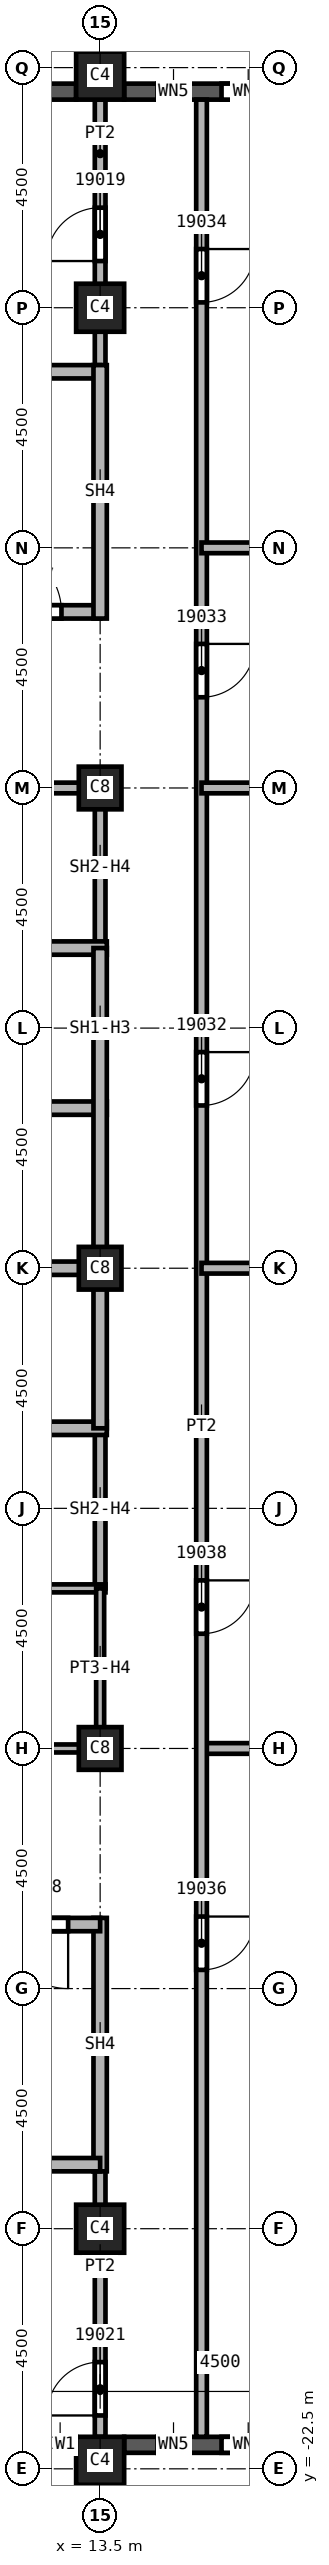
"""IFC4 building model, lengths in metres.
Left out: names, types, materials, properties, quantities, classifications, styles, units other than length and angle.
Written with IfcOpenShell. Run it as: python <this file> out.ifc"""

import sys

from ifc_helpers import new_model, si_unit, direction, frame, frame_2d, origin, origin_2d, place, context, subcontext, project, spatial, rectangle, extrude, element, fill, save


model = new_model("IFC4")
c1 = context("Model", 3, precision=1e-05, world=origin(), true_north=direction((0.0, 1.0)))
c2 = subcontext(c1, "Body", "Model", "MODEL_VIEW")
j1 = project(units=[si_unit("LENGTHUNIT", "METRE"), si_unit("PLANEANGLEUNIT", "RADIAN")], contexts=[c1])
p1 = place(None, origin())
s1 = spatial("IfcSite", under=j1, at=p1, CompositionType="ELEMENT")
p2 = place(p1, origin())
s2 = spatial("IfcBuilding", under=s1, at=p2, CompositionType="ELEMENT")
p3 = place(p2, frame((0.0, 0.0, 278.0)))
s3 = spatial("IfcBuildingStorey", under=s2, at=p3, CompositionType="ELEMENT", Elevation=278.0)
for number, where, z_axis, x_axis in (
    (1, (13.5, 18.0, 0.0), (0.0, 0.0, 1.0), (1.0, 0.0, 0.0)),
    (2, (13.5, -18.0, 0.0), (0.0, 0.0, 1.0), (1.0, 0.0, 0.0)),
):
    element("IfcColumn", number, at=place(p3, frame(where, z_axis=z_axis, x_axis=x_axis)), inside=s3, PredefinedType="COLUMN", context=c2, shape_type="SweptSolid", body=[
        extrude(rectangle(XDim=0.9, YDim=0.9, at=origin_2d()), origin(), (0.0, 0.0, 1.0), 3.72),
    ])
for number, where, z_axis, x_axis in (
    (3, (13.5, 0.0, 0.0), (0.0, 0.0, 1.0), (1.0, 0.0, 0.0)),
    (4, (13.5, 9.0, 0.0), (0.0, 0.0, 1.0), (1.0, 0.0, 0.0)),
    (5, (13.5, -9.0, 0.0), (0.0, 0.0, 1.0), (1.0, 0.0, 0.0)),
):
    element("IfcColumn", number, at=place(p3, frame(where, z_axis=z_axis, x_axis=x_axis)), inside=s3, PredefinedType="COLUMN", context=c2, shape_type="SweptSolid", body=[
        extrude(rectangle(XDim=0.8, YDim=0.8, at=origin_2d()), origin(), (0.0, 0.0, 1.0), 3.72),
    ])
for number, where, z_axis, x_axis in (
    (6, (13.5, 22.35, 0.0), (0.0, 0.0, 1.0), (1.0, 0.0, 0.0)),
    (7, (13.5, -22.35, 0.0), (0.0, 0.0, 1.0), (1.0, 0.0, 0.0)),
):
    element("IfcColumn", number, at=place(p3, frame(where, z_axis=z_axis, x_axis=x_axis)), inside=s3, PredefinedType="COLUMN", context=c2, shape_type="SweptSolid", body=[
        extrude(rectangle(XDim=0.9, YDim=0.9, at=origin_2d()), origin(), (0.0, 0.0, 1.0), 3.72),
    ])
p4 = place(p3, frame((9.45, -22.05, 0.0), z_axis=(0.0, 0.0, 1.0), x_axis=(1.0, 0.0, 0.0)))
e8 = element("IfcWall", 8, at=p4, inside=s3, PredefinedType="SOLIDWALL", context=c2, shape_type="SweptSolid", body=[
    extrude(rectangle(XDim=3.6, YDim=0.3, at=frame_2d((1.8, 0.0))), origin(), (0.0, 0.0, 1.0), 3.12),
])
p5 = place(p4, frame((0.6, 0.0, 0.8)))
e9 = element("IfcOpeningElement", 9, at=p5, cuts=e8, PredefinedType="OPENING", context=c2, shape_type="SweptSolid", body=[
    extrude(rectangle(XDim=2.4, YDim=1.95, at=frame_2d((1.2, 0.975))), frame((0.0, 0.15, 0.0), z_axis=(0.0, -1.0, 0.0), x_axis=(1.0, 0.0, 0.0)), (0.0, 0.0, 1.0), 0.3),
])
p6 = place(p3, frame((13.95, -22.05, 0.0), z_axis=(0.0, 0.0, 1.0), x_axis=(1.0, 0.0, 0.0)))
e10 = element("IfcWall", 10, at=p6, inside=s3, PredefinedType="SOLIDWALL", context=c2, shape_type="SweptSolid", body=[
    extrude(rectangle(XDim=3.6, YDim=0.3, at=frame_2d((1.8, 0.0))), origin(), (0.0, 0.0, 1.0), 3.12),
])
p7 = place(p6, frame((0.625, 0.0, 0.8)))
e11 = element("IfcOpeningElement", 11, at=p7, cuts=e10, PredefinedType="OPENING", context=c2, shape_type="SweptSolid", body=[
    extrude(rectangle(XDim=0.6, YDim=1.95, at=frame_2d((0.3, 0.975))), frame((0.0, 0.15, 0.0), z_axis=(0.0, -1.0, 0.0), x_axis=(1.0, 0.0, 0.0)), (0.0, 0.0, 1.0), 0.3),
])
p8 = place(p6, frame((1.825, 0.0, 0.8)))
e12 = element("IfcOpeningElement", 12, at=p8, cuts=e10, PredefinedType="OPENING", context=c2, shape_type="SweptSolid", body=[
    extrude(rectangle(XDim=1.0, YDim=1.95, at=frame_2d((0.5, 0.975))), frame((0.0, 0.15, 0.0), z_axis=(0.0, -1.0, 0.0), x_axis=(1.0, 0.0, 0.0)), (0.0, 0.0, 1.0), 0.3),
])
p9 = place(p3, frame((17.55, 22.05, 0.0), z_axis=(0.0, 0.0, 1.0), x_axis=(-1.0, 0.0, 0.0)))
e13 = element("IfcWall", 13, at=p9, inside=s3, PredefinedType="SOLIDWALL", context=c2, shape_type="SweptSolid", body=[
    extrude(rectangle(XDim=3.6, YDim=0.3, at=frame_2d((1.8, 0.0))), origin(), (0.0, 0.0, 1.0), 3.12),
])
p10 = place(p9, frame((0.775, 0.0, 0.8)))
e14 = element("IfcOpeningElement", 14, at=p10, cuts=e13, PredefinedType="OPENING", context=c2, shape_type="SweptSolid", body=[
    extrude(rectangle(XDim=1.0, YDim=1.95, at=frame_2d((0.5, 0.975))), frame((0.0, 0.15, 0.0), z_axis=(0.0, -1.0, 0.0), x_axis=(1.0, 0.0, 0.0)), (0.0, 0.0, 1.0), 0.3),
])
p11 = place(p9, frame((2.375, 0.0, 0.8)))
e15 = element("IfcOpeningElement", 15, at=p11, cuts=e13, PredefinedType="OPENING", context=c2, shape_type="SweptSolid", body=[
    extrude(rectangle(XDim=0.6, YDim=1.95, at=frame_2d((0.3, 0.975))), frame((0.0, 0.15, 0.0), z_axis=(0.0, -1.0, 0.0), x_axis=(1.0, 0.0, 0.0)), (0.0, 0.0, 1.0), 0.3),
])
p12 = place(p3, frame((13.05, 22.05, 0.0), z_axis=(0.0, 0.0, 1.0), x_axis=(-1.0, 0.0, 0.0)))
e16 = element("IfcWall", 16, at=p12, inside=s3, PredefinedType="SOLIDWALL", context=c2, shape_type="SweptSolid", body=[
    extrude(rectangle(XDim=3.6, YDim=0.3, at=frame_2d((1.8, 0.0))), origin(), (0.0, 0.0, 1.0), 3.12),
])
p13 = place(p12, frame((0.6, 0.0, 0.8)))
e17 = element("IfcOpeningElement", 17, at=p13, cuts=e16, PredefinedType="OPENING", context=c2, shape_type="SweptSolid", body=[
    extrude(rectangle(XDim=2.4, YDim=1.95, at=frame_2d((1.2, 0.975))), frame((0.0, 0.15, 0.0), z_axis=(0.0, -1.0, 0.0), x_axis=(1.0, 0.0, 0.0)), (0.0, 0.0, 1.0), 0.3),
])
p14 = place(p3, frame((13.5, -21.9, 0.0), z_axis=(0.0, 0.0, 1.0), x_axis=(0.0, 1.0, 0.0)))
e18 = element("IfcWall", 18, at=p14, inside=s3, PredefinedType="PARTITIONING", context=c2, shape_type="SweptSolid", body=[
    extrude(rectangle(XDim=5.225, YDim=0.2, at=frame_2d((2.612, 0.0))), origin(), (0.0, 0.0, 1.0), 3.72),
])
p15 = place(p14, frame((0.4, 0.0, 0.0)))
e19 = element("IfcOpeningElement", 19, at=p15, cuts=e18, PredefinedType="OPENING", context=c2, shape_type="SweptSolid", body=[
    extrude(rectangle(XDim=1.0, YDim=2.1, at=frame_2d((0.5, 1.05))), frame((0.0, 0.1, 0.0), z_axis=(0.0, -1.0, 0.0), x_axis=(1.0, 0.0, 0.0)), (0.0, 0.0, 1.0), 0.2),
])
p16 = place(p3, frame((13.5, 16.675, 0.0), z_axis=(0.0, 0.0, 1.0), x_axis=(0.0, 1.0, 0.0)))
e20 = element("IfcWall", 20, at=p16, inside=s3, PredefinedType="PARTITIONING", context=c2, shape_type="SweptSolid", body=[
    extrude(rectangle(XDim=5.225, YDim=0.2, at=frame_2d((2.612, 0.0))), origin(), (0.0, 0.0, 1.0), 3.72),
])
p17 = place(p16, frame((2.2, 0.0, 0.0)))
e21 = element("IfcOpeningElement", 21, at=p17, cuts=e20, PredefinedType="OPENING", context=c2, shape_type="SweptSolid", body=[
    extrude(rectangle(XDim=1.0, YDim=2.1, at=frame_2d((0.5, 1.05))), frame((0.0, 0.1, 0.0), z_axis=(0.0, -1.0, 0.0), x_axis=(1.0, 0.0, 0.0)), (0.0, 0.0, 1.0), 0.2),
])
p18 = place(p3, frame((15.4, -9.0, 0.0), z_axis=(0.0, 0.0, 1.0), x_axis=(1.0, 0.0, 0.0)))
e22 = element("IfcWall", 22, at=p18, inside=s3, PredefinedType="PARTITIONING", context=c2, shape_type="SweptSolid", body=[
    extrude(rectangle(XDim=11.15, YDim=0.2, at=frame_2d((5.575, 0.0))), origin(), (0.0, 0.0, 1.0), 3.72),
])
p19 = place(p3, frame((15.4, 21.9, 0.0), z_axis=(0.0, 0.0, 1.0), x_axis=(0.0, -1.0, 0.0)))
e23 = element("IfcWall", 23, at=p19, inside=s3, PredefinedType="PARTITIONING", context=c2, shape_type="SweptSolid", body=[
    extrude(rectangle(XDim=43.8, YDim=0.2, at=frame_2d((21.9, 0.0))), origin(), (0.0, 0.0, 1.0), 3.72),
])
p20 = place(p19, frame((17.85, 0.0, 0.0)))
e24 = element("IfcOpeningElement", 24, at=p20, cuts=e23, PredefinedType="OPENING", context=c2, shape_type="SweptSolid", body=[
    extrude(rectangle(XDim=1.0, YDim=2.1, at=frame_2d((0.5, 1.05))), frame((0.0, 0.1, 0.0), z_axis=(0.0, -1.0, 0.0), x_axis=(1.0, 0.0, 0.0)), (0.0, 0.0, 1.0), 0.2),
])
p21 = place(p19, frame((10.2, 0.0, 0.0)))
e25 = element("IfcOpeningElement", 25, at=p21, cuts=e23, PredefinedType="OPENING", context=c2, shape_type="SweptSolid", body=[
    extrude(rectangle(XDim=1.0, YDim=2.1, at=frame_2d((0.5, 1.05))), frame((0.0, 0.1, 0.0), z_axis=(0.0, -1.0, 0.0), x_axis=(1.0, 0.0, 0.0)), (0.0, 0.0, 1.0), 0.2),
])
p22 = place(p19, frame((2.8, 0.0, 0.0)))
e26 = element("IfcOpeningElement", 26, at=p22, cuts=e23, PredefinedType="OPENING", context=c2, shape_type="SweptSolid", body=[
    extrude(rectangle(XDim=1.0, YDim=2.1, at=frame_2d((0.5, 1.05))), frame((0.0, 0.1, 0.0), z_axis=(0.0, -1.0, 0.0), x_axis=(1.0, 0.0, 0.0)), (0.0, 0.0, 1.0), 0.2),
])
p23 = place(p19, frame((34.05, 0.0, 0.0)))
e27 = element("IfcOpeningElement", 27, at=p23, cuts=e23, PredefinedType="OPENING", context=c2, shape_type="SweptSolid", body=[
    extrude(rectangle(XDim=1.0, YDim=2.1, at=frame_2d((0.5, 1.05))), frame((0.0, 0.1, 0.0), z_axis=(0.0, -1.0, 0.0), x_axis=(1.0, 0.0, 0.0)), (0.0, 0.0, 1.0), 0.2),
])
p24 = place(p19, frame((27.75, 0.0, 0.0)))
e28 = element("IfcOpeningElement", 28, at=p24, cuts=e23, PredefinedType="OPENING", context=c2, shape_type="SweptSolid", body=[
    extrude(rectangle(XDim=1.0, YDim=2.1, at=frame_2d((0.5, 1.05))), frame((0.0, 0.1, 0.0), z_axis=(0.0, -1.0, 0.0), x_axis=(1.0, 0.0, 0.0)), (0.0, 0.0, 1.0), 0.2),
])
for number, where, z_axis, x_axis in (
    (29, (15.4, 9.0, 0.0), (0.0, 0.0, 1.0), (1.0, 0.0, 0.0)),
    (30, (15.4, 13.5, 0.0), (0.0, 0.0, 1.0), (1.0, 0.0, 0.0)),
    (31, (26.55, 0.0, 0.0), (0.0, 0.0, 1.0), (-1.0, 0.0, 0.0)),
):
    element("IfcWall", number, at=place(p3, frame(where, z_axis=z_axis, x_axis=x_axis)), inside=s3, PredefinedType="PARTITIONING", context=c2, shape_type="SweptSolid", body=[
        extrude(rectangle(XDim=11.15, YDim=0.2, at=frame_2d((5.575, 0.0))), origin(), (0.0, 0.0, 1.0), 3.72),
    ])
for number, where, z_axis, x_axis in (
    (32, (10.5, 9.0, 0.0), (0.0, 0.0, 1.0), (1.0, 0.0, 0.0)),
    (33, (13.5, -3.0, 0.0), (0.0, 0.0, 1.0), (0.0, -1.0, 0.0)),
):
    element("IfcWall", number, at=place(p3, frame(where, z_axis=z_axis, x_axis=x_axis)), inside=s3, PredefinedType="SOLIDWALL", context=c2, shape_type="SweptSolid", body=[
        extrude(rectangle(XDim=3.0, YDim=0.2, at=frame_2d((1.5, 0.0))), origin(), (0.0, 0.0, 1.0), 3.042),
    ])
p25 = place(p3, frame((13.5, 9.1, 0.0), z_axis=(0.0, 0.0, 1.0), x_axis=(0.0, -1.0, 0.0)))
e34 = element("IfcWall", 34, at=p25, inside=s3, PredefinedType="SOLIDWALL", context=c2, shape_type="SweptSolid", body=[
    extrude(rectangle(XDim=3.1, YDim=0.2, at=frame_2d((1.55, 0.0))), origin(), (0.0, 0.0, 1.0), 3.042),
])
p26 = place(p3, frame((4.375, -3.0, 0.0), z_axis=(0.0, 0.0, 1.0), x_axis=(1.0, 0.0, 0.0)))
e35 = element("IfcWall", 35, at=p26, inside=s3, PredefinedType="SOLIDWALL", context=c2, shape_type="SweptSolid", body=[
    extrude(rectangle(XDim=9.25, YDim=0.25, at=frame_2d((4.625, 0.0))), origin(), (0.0, 0.0, 1.0), 3.72),
])
p27 = place(p26, frame((4.875, 0.0, 0.0)))
e36 = element("IfcOpeningElement", 36, at=p27, cuts=e35, PredefinedType="OPENING", context=c2, shape_type="SweptSolid", body=[
    extrude(rectangle(XDim=1.1, YDim=2.1, at=frame_2d((0.55, 1.05))), frame((0.0, 0.125, 0.0), z_axis=(0.0, -1.0, 0.0), x_axis=(1.0, 0.0, 0.0)), (0.0, 0.0, 1.0), 0.25),
])
p28 = place(p3, frame((7.5, 3.0, 0.0), z_axis=(0.0, 0.0, 1.0), x_axis=(1.0, 0.0, 0.0)))
e37 = element("IfcWall", 37, at=p28, inside=s3, PredefinedType="SOLIDWALL", context=c2, shape_type="SweptSolid", body=[
    extrude(rectangle(XDim=6.125, YDim=0.25, at=frame_2d((3.062, 0.0))), origin(), (0.0, 0.0, 1.0), 3.72),
])
p29 = place(p28, frame((1.75, 0.0, 0.0)))
e38 = element("IfcOpeningElement", 38, at=p29, cuts=e37, PredefinedType="OPENING", context=c2, shape_type="SweptSolid", body=[
    extrude(rectangle(XDim=1.1, YDim=2.1, at=frame_2d((0.55, 1.05))), frame((0.0, 0.125, 0.0), z_axis=(0.0, -1.0, 0.0), x_axis=(1.0, 0.0, 0.0)), (0.0, 0.0, 1.0), 0.25),
])
for number, where, z_axis, x_axis in (
    (39, (10.5, 0.0, 0.0), (0.0, 0.0, 1.0), (1.0, 0.0, 0.0)),
    (40, (10.5, 6.0, 0.0), (0.0, 0.0, 1.0), (1.0, 0.0, 0.0)),
):
    element("IfcWall", number, at=place(p3, frame(where, z_axis=z_axis, x_axis=x_axis)), inside=s3, PredefinedType="SOLIDWALL", context=c2, shape_type="SweptSolid", body=[
        extrude(rectangle(XDim=3.125, YDim=0.25, at=frame_2d((1.562, 0.0))), origin(), (0.0, 0.0, 1.0), 3.72),
    ])
p30 = place(p3, frame((13.5, 6.0, 0.0), z_axis=(0.0, 0.0, 1.0), x_axis=(0.0, -1.0, 0.0)))
e41 = element("IfcWall", 41, at=p30, inside=s3, PredefinedType="SOLIDWALL", context=c2, shape_type="SweptSolid", body=[
    extrude(rectangle(XDim=9.0, YDim=0.25, at=frame_2d((4.5, 0.0))), origin(), (0.0, 0.0, 1.0), 3.042),
])
p31 = place(p3, frame((4.375, 12.3, 0.0), z_axis=(0.0, 0.0, 1.0), x_axis=(1.0, 0.0, 0.0)))
e42 = element("IfcWall", 42, at=p31, inside=s3, PredefinedType="SOLIDWALL", context=c2, shape_type="SweptSolid", body=[
    extrude(rectangle(XDim=9.125, YDim=0.25, at=frame_2d((4.562, 0.0))), origin(), (0.0, 0.0, 1.0), 3.72),
])
p32 = place(p31, frame((7.2, 0.0, 0.0)))
e43 = element("IfcOpeningElement", 43, at=p32, cuts=e42, PredefinedType="OPENING", context=c2, shape_type="SweptSolid", body=[
    extrude(rectangle(XDim=1.2, YDim=2.1, at=frame_2d((0.6, 1.05))), frame((0.0, 0.125, 0.0), z_axis=(0.0, -1.0, 0.0), x_axis=(1.0, 0.0, 0.0)), (0.0, 0.0, 1.0), 0.25),
])
p33 = place(p3, frame((4.375, 16.8, 0.0), z_axis=(0.0, 0.0, 1.0), x_axis=(1.0, 0.0, 0.0)))
e44 = element("IfcWall", 44, at=p33, inside=s3, PredefinedType="SOLIDWALL", context=c2, shape_type="SweptSolid", body=[
    extrude(rectangle(XDim=9.125, YDim=0.25, at=frame_2d((4.562, 0.0))), origin(), (0.0, 0.0, 1.0), 3.72),
])
p34 = place(p3, frame((13.5, -16.925, 0.0), z_axis=(0.0, 0.0, 1.0), x_axis=(0.0, 1.0, 0.0)))
e45 = element("IfcWall", 45, at=p34, inside=s3, PredefinedType="SOLIDWALL", context=c2, shape_type="SweptSolid", body=[
    extrude(rectangle(XDim=4.75, YDim=0.25, at=frame_2d((2.375, 0.0))), origin(), (0.0, 0.0, 1.0), 3.72),
])
p35 = place(p3, frame((13.5, -16.8, 0.0), z_axis=(0.0, 0.0, 1.0), x_axis=(-1.0, 0.0, 0.0)))
e46 = element("IfcWall", 46, at=p35, inside=s3, PredefinedType="SOLIDWALL", context=c2, shape_type="SweptSolid", body=[
    extrude(rectangle(XDim=9.125, YDim=0.25, at=frame_2d((4.562, 0.0))), origin(), (0.0, 0.0, 1.0), 3.72),
])
p36 = place(p3, frame((13.5, -12.3, 0.0), z_axis=(0.0, 0.0, 1.0), x_axis=(-1.0, 0.0, 0.0)))
e47 = element("IfcWall", 47, at=p36, inside=s3, PredefinedType="SOLIDWALL", context=c2, shape_type="SweptSolid", body=[
    extrude(rectangle(XDim=9.125, YDim=0.25, at=frame_2d((4.562, 0.0))), origin(), (0.0, 0.0, 1.0), 3.72),
])
p37 = place(p36, frame((0.6, 0.0, 0.0)))
e48 = element("IfcOpeningElement", 48, at=p37, cuts=e47, PredefinedType="OPENING", context=c2, shape_type="SweptSolid", body=[
    extrude(rectangle(XDim=1.2, YDim=2.1, at=frame_2d((0.6, 1.05))), frame((0.0, 0.125, 0.0), z_axis=(0.0, -1.0, 0.0), x_axis=(1.0, 0.0, 0.0)), (0.0, 0.0, 1.0), 0.25),
])
p38 = place(p3, frame((13.5, 12.175, 0.0), z_axis=(0.0, 0.0, 1.0), x_axis=(0.0, 1.0, 0.0)))
e49 = element("IfcWall", 49, at=p38, inside=s3, PredefinedType="SOLIDWALL", context=c2, shape_type="SweptSolid", body=[
    extrude(rectangle(XDim=4.75, YDim=0.25, at=frame_2d((2.375, 0.0))), origin(), (0.0, 0.0, 1.0), 3.72),
])
p39 = place(p3, frame((10.5, -6.0, 0.0), z_axis=(0.0, 0.0, 1.0), x_axis=(1.0, 0.0, 0.0)))
e50 = element("IfcWall", 50, at=p39, inside=s3, PredefinedType="PARTITIONING", context=c2, shape_type="SweptSolid", body=[
    extrude(rectangle(XDim=3.1, YDim=0.15, at=frame_2d((1.55, 0.0))), origin(), (0.0, 0.0, 1.0), 3.72),
])
p40 = place(p3, frame((13.5, -9.0, 0.0), z_axis=(0.0, 0.0, 1.0), x_axis=(-1.0, 0.0, 0.0)))
e51 = element("IfcWall", 51, at=p40, inside=s3, PredefinedType="PARTITIONING", context=c2, shape_type="SweptSolid", body=[
    extrude(rectangle(XDim=3.0, YDim=0.15, at=frame_2d((1.5, 0.0))), origin(), (0.0, 0.0, 1.0), 3.042),
])
p41 = place(p3, frame((13.5, -6.0, 0.0), z_axis=(0.0, 0.0, 1.0), x_axis=(0.0, -1.0, 0.0)))
e52 = element("IfcWall", 52, at=p41, inside=s3, PredefinedType="PARTITIONING", context=c2, shape_type="SweptSolid", body=[
    extrude(rectangle(XDim=3.075, YDim=0.15, at=frame_2d((1.538, 0.0))), origin(), (0.0, 0.0, 1.0), 3.042),
])
p42 = place(p32, origin())
e53 = element("IfcDoor", 53, at=p42, inside=s3, OperationType="SINGLE_SWING_RIGHT", PredefinedType="DOOR", context=c2, shape_type="SweptSolid", body=[
    extrude(rectangle(XDim=1.2, YDim=2.1, at=frame_2d((0.6, 1.05))), frame((0.0, 0.025, 0.0), z_axis=(0.0, -1.0, 0.0), x_axis=(1.0, 0.0, 0.0)), (0.0, 0.0, 1.0), 0.05),
])
fill(e43, e53)
p43 = place(p37, origin())
e54 = element("IfcDoor", 54, at=p43, inside=s3, OperationType="SINGLE_SWING_LEFT", PredefinedType="DOOR", context=c2, shape_type="SweptSolid", body=[
    extrude(rectangle(XDim=1.2, YDim=2.1, at=frame_2d((0.6, 1.05))), frame((0.0, 0.025, 0.0), z_axis=(0.0, -1.0, 0.0), x_axis=(1.0, 0.0, 0.0)), (0.0, 0.0, 1.0), 0.05),
])
fill(e48, e54)
p44 = place(p17, origin())
e55 = element("IfcDoor", 55, at=p44, inside=s3, OperationType="SINGLE_SWING_RIGHT", PredefinedType="DOOR", context=c2, shape_type="SweptSolid", body=[
    extrude(rectangle(XDim=1.0, YDim=2.1, at=frame_2d((0.5, 1.05))), frame((0.0, 0.025, 0.0), z_axis=(0.0, -1.0, 0.0), x_axis=(1.0, 0.0, 0.0)), (0.0, 0.0, 1.0), 0.05),
])
fill(e21, e55)
p45 = place(p15, origin())
e56 = element("IfcDoor", 56, at=p45, inside=s3, OperationType="SINGLE_SWING_RIGHT", PredefinedType="DOOR", context=c2, shape_type="SweptSolid", body=[
    extrude(rectangle(XDim=1.0, YDim=2.1, at=frame_2d((0.5, 1.05))), frame((0.0, 0.025, 0.0), z_axis=(0.0, -1.0, 0.0), x_axis=(1.0, 0.0, 0.0)), (0.0, 0.0, 1.0), 0.05),
])
fill(e19, e56)
p46 = place(p20, origin())
e57 = element("IfcDoor", 57, at=p46, inside=s3, OperationType="SINGLE_SWING_LEFT", PredefinedType="DOOR", context=c2, shape_type="SweptSolid", body=[
    extrude(rectangle(XDim=1.0, YDim=2.1, at=frame_2d((0.5, 1.05))), frame((0.0, 0.025, 0.0), z_axis=(0.0, -1.0, 0.0), x_axis=(1.0, 0.0, 0.0)), (0.0, 0.0, 1.0), 0.05),
])
fill(e24, e57)
p47 = place(p21, origin())
e58 = element("IfcDoor", 58, at=p47, inside=s3, OperationType="SINGLE_SWING_RIGHT", PredefinedType="DOOR", context=c2, shape_type="SweptSolid", body=[
    extrude(rectangle(XDim=1.0, YDim=2.1, at=frame_2d((0.5, 1.05))), frame((0.0, 0.025, 0.0), z_axis=(0.0, -1.0, 0.0), x_axis=(1.0, 0.0, 0.0)), (0.0, 0.0, 1.0), 0.05),
])
fill(e25, e58)
p48 = place(p22, origin())
e59 = element("IfcDoor", 59, at=p48, inside=s3, OperationType="SINGLE_SWING_LEFT", PredefinedType="DOOR", context=c2, shape_type="SweptSolid", body=[
    extrude(rectangle(XDim=1.0, YDim=2.1, at=frame_2d((0.5, 1.05))), frame((0.0, 0.025, 0.0), z_axis=(0.0, -1.0, 0.0), x_axis=(1.0, 0.0, 0.0)), (0.0, 0.0, 1.0), 0.05),
])
fill(e26, e59)
p49 = place(p23, origin())
e60 = element("IfcDoor", 60, at=p49, inside=s3, OperationType="SINGLE_SWING_LEFT", PredefinedType="DOOR", context=c2, shape_type="SweptSolid", body=[
    extrude(rectangle(XDim=1.0, YDim=2.1, at=frame_2d((0.5, 1.05))), frame((0.0, 0.025, 0.0), z_axis=(0.0, -1.0, 0.0), x_axis=(1.0, 0.0, 0.0)), (0.0, 0.0, 1.0), 0.05),
])
fill(e27, e60)
p50 = place(p24, origin())
e61 = element("IfcDoor", 61, at=p50, inside=s3, OperationType="SINGLE_SWING_LEFT", PredefinedType="DOOR", context=c2, shape_type="SweptSolid", body=[
    extrude(rectangle(XDim=1.0, YDim=2.1, at=frame_2d((0.5, 1.05))), frame((0.0, 0.025, 0.0), z_axis=(0.0, -1.0, 0.0), x_axis=(1.0, 0.0, 0.0)), (0.0, 0.0, 1.0), 0.05),
])
fill(e28, e61)
p51 = place(p7, origin())
e62 = element("IfcWindow", 62, at=p51, inside=s3, PartitioningType="SINGLE_PANEL", PredefinedType="WINDOW", context=c2, shape_type="SweptSolid", body=[
    extrude(rectangle(XDim=0.6, YDim=1.95, at=frame_2d((0.3, 0.975))), frame((0.0, 0.03, 0.0), z_axis=(0.0, -1.0, 0.0), x_axis=(1.0, 0.0, 0.0)), (0.0, 0.0, 1.0), 0.06),
])
fill(e11, e62)
p52 = place(p8, origin())
e63 = element("IfcWindow", 63, at=p52, inside=s3, PartitioningType="SINGLE_PANEL", PredefinedType="WINDOW", context=c2, shape_type="SweptSolid", body=[
    extrude(rectangle(XDim=1.0, YDim=1.95, at=frame_2d((0.5, 0.975))), frame((0.0, 0.03, 0.0), z_axis=(0.0, -1.0, 0.0), x_axis=(1.0, 0.0, 0.0)), (0.0, 0.0, 1.0), 0.06),
])
fill(e12, e63)
p53 = place(p10, origin())
e64 = element("IfcWindow", 64, at=p53, inside=s3, PartitioningType="SINGLE_PANEL", PredefinedType="WINDOW", context=c2, shape_type="SweptSolid", body=[
    extrude(rectangle(XDim=1.0, YDim=1.95, at=frame_2d((0.5, 0.975))), frame((0.0, 0.03, 0.0), z_axis=(0.0, -1.0, 0.0), x_axis=(1.0, 0.0, 0.0)), (0.0, 0.0, 1.0), 0.06),
])
fill(e14, e64)
p54 = place(p11, origin())
e65 = element("IfcWindow", 65, at=p54, inside=s3, PartitioningType="SINGLE_PANEL", PredefinedType="WINDOW", context=c2, shape_type="SweptSolid", body=[
    extrude(rectangle(XDim=0.6, YDim=1.95, at=frame_2d((0.3, 0.975))), frame((0.0, 0.03, 0.0), z_axis=(0.0, -1.0, 0.0), x_axis=(1.0, 0.0, 0.0)), (0.0, 0.0, 1.0), 0.06),
])
fill(e15, e65)
save(model, sys.argv[1])
